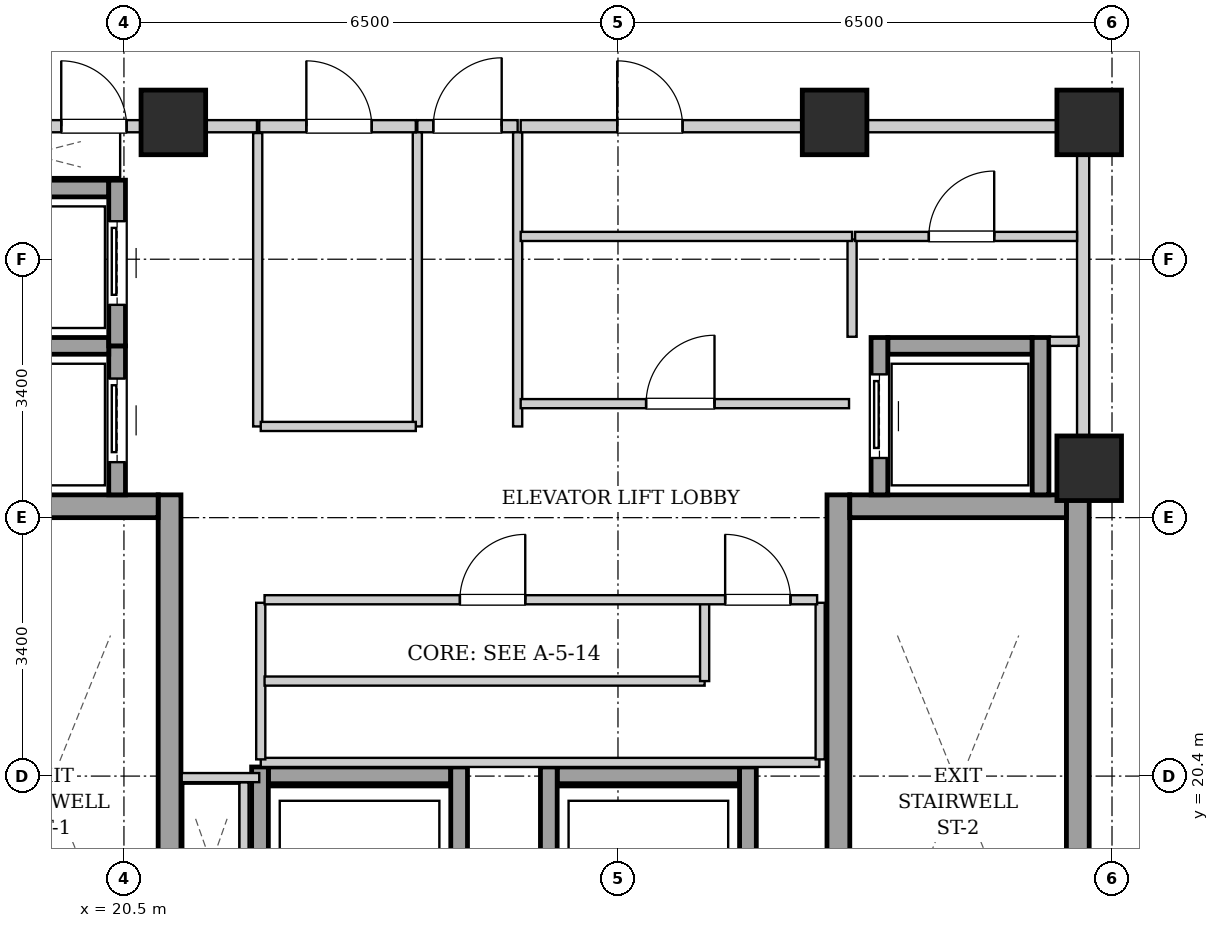
"""IFC4 building model, lengths in metres.
Left out: names, types, materials, properties, quantities, classifications, styles, units other than length and angle.
Written with IfcOpenShell. Run it as: python <this file> out.ifc"""

import sys

from ifc_helpers import new_model, si_unit, direction, frame, frame_2d, origin, origin_2d, place, context, subcontext, project, spatial, rectangle, extrude, element, fill, save


model = new_model("IFC4")
c1 = context("Model", 3, precision=1e-05, world=origin(), true_north=direction((0.0, 1.0)))
c2 = subcontext(c1, "Body", "Model", "MODEL_VIEW")
j1 = project(units=[si_unit("LENGTHUNIT", "METRE"), si_unit("PLANEANGLEUNIT", "RADIAN")], contexts=[c1])
p1 = place(None, origin())
s1 = spatial("IfcSite", under=j1, at=p1, CompositionType="ELEMENT")
p2 = place(p1, origin())
s2 = spatial("IfcBuilding", under=s1, at=p2, CompositionType="ELEMENT")
p3 = place(p2, frame((0.0, 0.0, 197.5)))
s3 = spatial("IfcBuildingStorey", under=s2, at=p3, CompositionType="ELEMENT", Elevation=197.5)
for number, where, z_axis, x_axis in (
    (1, (21.15, 29.0, 0.0), (0.0, 0.0, 1.0), (1.0, 0.0, 0.0)),
    (2, (29.85, 29.0, 0.0), (0.0, 0.0, 1.0), (1.0, 0.0, 0.0)),
    (3, (33.2, 29.0, 0.0), (0.0, 0.0, 1.0), (1.0, 0.0, 0.0)),
    (4, (33.2, 24.45, 0.0), (0.0, 0.0, 1.0), (1.0, 0.0, 0.0)),
):
    element("IfcColumn", number, at=place(p3, frame(where, z_axis=z_axis, x_axis=x_axis)), inside=s3, PredefinedType="COLUMN", context=c2, shape_type="SweptSolid", body=[
        extrude(rectangle(XDim=0.85, YDim=0.85, at=origin_2d()), origin(), (0.0, 0.0, 1.0), 3.3),
    ])
p4 = place(p3, frame((21.1, 15.1, 0.0), z_axis=(0.0, 0.0, 1.0), x_axis=(0.0, 1.0, 0.0)))
e5 = element("IfcWall", 5, at=p4, inside=s3, PredefinedType="SHEAR", context=c2, shape_type="SweptSolid", body=[
    extrude(rectangle(XDim=9.0, YDim=0.3, at=frame_2d((4.5, 0.0))), origin(), (0.0, 0.0, 1.0), 3.04),
])
p5 = place(p3, frame((18.1, 23.95, 0.0), z_axis=(0.0, 0.0, 1.0), x_axis=(1.0, 0.0, 0.0)))
e6 = element("IfcWall", 6, at=p5, inside=s3, PredefinedType="SHEAR", context=c2, shape_type="SweptSolid", body=[
    extrude(rectangle(XDim=2.85, YDim=0.3, at=frame_2d((1.425, 0.0))), origin(), (0.0, 0.0, 1.0), 3.04),
])
for number, where, z_axis, x_axis in (
    (7, (29.9, 15.1, 0.0), (0.0, 0.0, 1.0), (0.0, 1.0, 0.0)),
    (8, (33.05, 15.1, 0.0), (0.0, 0.0, 1.0), (0.0, 1.0, 0.0)),
):
    element("IfcWall", number, at=place(p3, frame(where, z_axis=z_axis, x_axis=x_axis)), inside=s3, PredefinedType="SHEAR", context=c2, shape_type="SweptSolid", body=[
        extrude(rectangle(XDim=9.0, YDim=0.3, at=frame_2d((4.5, 0.0))), origin(), (0.0, 0.0, 1.0), 3.04),
    ])
p6 = place(p3, frame((30.05, 23.95, 0.0), z_axis=(0.0, 0.0, 1.0), x_axis=(1.0, 0.0, 0.0)))
e9 = element("IfcWall", 9, at=p6, inside=s3, PredefinedType="SHEAR", context=c2, shape_type="SweptSolid", body=[
    extrude(rectangle(XDim=2.85, YDim=0.3, at=frame_2d((1.425, 0.0))), origin(), (0.0, 0.0, 1.0), 3.04),
])
p7 = place(p3, frame((20.41, 24.1, 0.0), z_axis=(0.0, 0.0, 1.0), x_axis=(0.0, 1.0, 0.0)))
e10 = element("IfcWall", 10, at=p7, inside=s3, PredefinedType="SHEAR", context=c2, shape_type="SweptSolid", body=[
    extrude(rectangle(XDim=1.96, YDim=0.22, at=frame_2d((0.98, 0.0))), origin(), (0.0, 0.0, 1.0), 3.04),
])
p8 = place(p7, frame((0.43, 0.0, 0.0)))
e11 = element("IfcOpeningElement", 11, at=p8, cuts=e10, PredefinedType="OPENING", context=c2, shape_type="SweptSolid", body=[
    extrude(rectangle(XDim=1.1, YDim=2.15, at=frame_2d((0.55, 1.075))), frame((0.0, 0.12, 0.0), z_axis=(0.0, -1.0, 0.0), x_axis=(1.0, 0.0, 0.0)), (0.0, 0.0, 1.0), 0.24),
])
for number, where, z_axis, x_axis in (
    (12, (18.4, 26.06, 0.0), (0.0, 0.0, 1.0), (1.0, 0.0, 0.0)),
    (13, (18.4, 28.13, 0.0), (0.0, 0.0, 1.0), (1.0, 0.0, 0.0)),
):
    element("IfcWall", number, at=place(p3, frame(where, z_axis=z_axis, x_axis=x_axis)), inside=s3, PredefinedType="SHEAR", context=c2, shape_type="SweptSolid", body=[
        extrude(rectangle(XDim=1.9, YDim=0.22, at=frame_2d((0.95, 0.0))), origin(), (0.0, 0.0, 1.0), 3.04),
    ])
p9 = place(p3, frame((20.41, 26.06, 0.0), z_axis=(0.0, 0.0, 1.0), x_axis=(0.0, 1.0, 0.0)))
e14 = element("IfcWall", 14, at=p9, inside=s3, PredefinedType="SHEAR", context=c2, shape_type="SweptSolid", body=[
    extrude(rectangle(XDim=2.18, YDim=0.22, at=frame_2d((1.09, 0.0))), origin(), (0.0, 0.0, 1.0), 3.04),
])
p10 = place(p9, frame((0.54, 0.0, 0.0)))
e15 = element("IfcOpeningElement", 15, at=p10, cuts=e14, PredefinedType="OPENING", context=c2, shape_type="SweptSolid", body=[
    extrude(rectangle(XDim=1.1, YDim=2.15, at=frame_2d((0.55, 1.075))), frame((0.0, 0.12, 0.0), z_axis=(0.0, -1.0, 0.0), x_axis=(1.0, 0.0, 0.0)), (0.0, 0.0, 1.0), 0.24),
])
p11 = place(p3, frame((30.55, 26.06, 0.0), z_axis=(0.0, 0.0, 1.0), x_axis=(1.0, 0.0, 0.0)))
e16 = element("IfcWall", 16, at=p11, inside=s3, PredefinedType="SHEAR", context=c2, shape_type="SweptSolid", body=[
    extrude(rectangle(XDim=1.9, YDim=0.22, at=frame_2d((0.95, 0.0))), origin(), (0.0, 0.0, 1.0), 3.04),
])
p12 = place(p3, frame((30.44, 24.1, 0.0), z_axis=(0.0, 0.0, 1.0), x_axis=(0.0, 1.0, 0.0)))
e17 = element("IfcWall", 17, at=p12, inside=s3, PredefinedType="SHEAR", context=c2, shape_type="SweptSolid", body=[
    extrude(rectangle(XDim=2.07, YDim=0.22, at=frame_2d((1.035, 0.0))), origin(), (0.0, 0.0, 1.0), 3.04),
])
p13 = place(p12, frame((0.485, 0.0, 0.0)))
e18 = element("IfcOpeningElement", 18, at=p13, cuts=e17, PredefinedType="OPENING", context=c2, shape_type="SweptSolid", body=[
    extrude(rectangle(XDim=1.1, YDim=2.15, at=frame_2d((0.55, 1.075))), frame((0.0, 0.12, 0.0), z_axis=(0.0, -1.0, 0.0), x_axis=(1.0, 0.0, 0.0)), (0.0, 0.0, 1.0), 0.24),
])
p14 = place(p3, frame((32.56, 24.1, 0.0), z_axis=(0.0, 0.0, 1.0), x_axis=(0.0, 1.0, 0.0)))
e19 = element("IfcWall", 19, at=p14, inside=s3, PredefinedType="SHEAR", context=c2, shape_type="SweptSolid", body=[
    extrude(rectangle(XDim=2.07, YDim=0.22, at=frame_2d((1.035, 0.0))), origin(), (0.0, 0.0, 1.0), 3.04),
])
p15 = place(p3, frame((22.4, 20.41, 0.0), z_axis=(0.0, 0.0, 1.0), x_axis=(1.0, 0.0, 0.0)))
e20 = element("IfcWall", 20, at=p15, inside=s3, PredefinedType="SHEAR", context=c2, shape_type="SweptSolid", body=[
    extrude(rectangle(XDim=2.4, YDim=0.22, at=frame_2d((1.2, 0.0))), origin(), (0.0, 0.0, 1.0), 3.04),
])
for number, where, z_axis, x_axis in (
    (21, (22.29, 17.98, 0.0), (0.0, 0.0, 1.0), (0.0, 1.0, 0.0)),
    (22, (24.91, 17.98, 0.0), (0.0, 0.0, 1.0), (0.0, 1.0, 0.0)),
):
    element("IfcWall", number, at=place(p3, frame(where, z_axis=z_axis, x_axis=x_axis)), inside=s3, PredefinedType="SHEAR", context=c2, shape_type="SweptSolid", body=[
        extrude(rectangle(XDim=2.54, YDim=0.22, at=frame_2d((1.27, 0.0))), origin(), (0.0, 0.0, 1.0), 3.04),
    ])
p16 = place(p3, frame((26.2, 20.41, 0.0), z_axis=(0.0, 0.0, 1.0), x_axis=(1.0, 0.0, 0.0)))
e23 = element("IfcWall", 23, at=p16, inside=s3, PredefinedType="SHEAR", context=c2, shape_type="SweptSolid", body=[
    extrude(rectangle(XDim=2.4, YDim=0.22, at=frame_2d((1.2, 0.0))), origin(), (0.0, 0.0, 1.0), 3.04),
])
for number, where, z_axis, x_axis in (
    (24, (26.09, 17.98, 0.0), (0.0, 0.0, 1.0), (0.0, 1.0, 0.0)),
    (25, (28.71, 17.98, 0.0), (0.0, 0.0, 1.0), (0.0, 1.0, 0.0)),
):
    element("IfcWall", number, at=place(p3, frame(where, z_axis=z_axis, x_axis=x_axis)), inside=s3, PredefinedType="SHEAR", context=c2, shape_type="SweptSolid", body=[
        extrude(rectangle(XDim=2.54, YDim=0.22, at=frame_2d((1.27, 0.0))), origin(), (0.0, 0.0, 1.0), 3.04),
    ])
p17 = place(p3, frame((33.12, 24.12, 0.0), z_axis=(0.0, 0.0, 1.0), x_axis=(0.0, 1.0, 0.0)))
e26 = element("IfcWall", 26, at=p17, inside=s3, PredefinedType="PARTITIONING", context=c2, shape_type="SweptSolid", body=[
    extrude(rectangle(XDim=4.76, YDim=0.16, at=frame_2d((2.38, 0.0))), origin(), (0.0, 0.0, 1.0), 2.375),
])
p18 = place(p3, frame((24.36, 28.95, 0.0), z_axis=(0.0, 0.0, 1.0), x_axis=(1.0, 0.0, 0.0)))
e27 = element("IfcWall", 27, at=p18, inside=s3, PredefinedType="PARTITIONING", context=c2, shape_type="SweptSolid", body=[
    extrude(rectangle(XDim=1.32, YDim=0.16, at=frame_2d((0.66, 0.0))), origin(), (0.0, 0.0, 1.0), 2.556),
])
p19 = place(p18, frame((0.21, 0.0, 0.0)))
e28 = element("IfcOpeningElement", 28, at=p19, cuts=e27, PredefinedType="OPENING", context=c2, shape_type="SweptSolid", body=[
    extrude(rectangle(XDim=0.9, YDim=2.05, at=frame_2d((0.45, 1.025))), frame((0.0, 0.09, 0.0), z_axis=(0.0, -1.0, 0.0), x_axis=(1.0, 0.0, 0.0)), (0.0, 0.0, 1.0), 0.18),
])
p20 = place(p3, frame((17.96, 28.95, 0.0), z_axis=(0.0, 0.0, 1.0), x_axis=(1.0, 0.0, 0.0)))
e29 = element("IfcWall", 29, at=p20, inside=s3, PredefinedType="PARTITIONING", context=c2, shape_type="SweptSolid", body=[
    extrude(rectangle(XDim=4.29, YDim=0.16, at=frame_2d((2.145, 0.0))), origin(), (0.0, 0.0, 1.0), 2.556),
])
p21 = place(p20, frame((1.715, 0.0, 0.0)))
e30 = element("IfcOpeningElement", 30, at=p21, cuts=e29, PredefinedType="OPENING", context=c2, shape_type="SweptSolid", body=[
    extrude(rectangle(XDim=0.86, YDim=2.05, at=frame_2d((0.43, 1.025))), frame((0.0, 0.09, 0.0), z_axis=(0.0, -1.0, 0.0), x_axis=(1.0, 0.0, 0.0)), (0.0, 0.0, 1.0), 0.18),
])
p22 = place(p3, frame((22.08, 18.2, 0.0), z_axis=(0.0, 0.0, 1.0), x_axis=(0.0, 1.0, 0.0)))
e31 = element("IfcWall", 31, at=p22, inside=s3, PredefinedType="PARTITIONING", context=c2, shape_type="SweptSolid", body=[
    extrude(rectangle(XDim=2.12, YDim=0.12, at=frame_2d((1.06, 0.0))), origin(), (0.0, 0.0, 1.0), 3.04),
])
p23 = place(p3, frame((22.28, 20.38, 0.0), z_axis=(0.0, 0.0, 1.0), x_axis=(-1.0, 0.0, 0.0)))
e32 = element("IfcWall", 32, at=p23, inside=s3, PredefinedType="PARTITIONING", context=c2, shape_type="SweptSolid", body=[
    extrude(rectangle(XDim=1.02, YDim=0.12, at=frame_2d((0.51, 0.0))), origin(), (0.0, 0.0, 1.0), 3.04),
])
for number, where, z_axis, x_axis in (
    (33, (24.36, 25.0, 0.0), (0.0, 0.0, 1.0), (0.0, 1.0, 0.0)),
    (34, (25.68, 25.0, 0.0), (0.0, 0.0, 1.0), (0.0, 1.0, 0.0)),
):
    element("IfcWall", number, at=place(p3, frame(where, z_axis=z_axis, x_axis=x_axis)), inside=s3, PredefinedType="PARTITIONING", context=c2, shape_type="SweptSolid", body=[
        extrude(rectangle(XDim=3.87, YDim=0.12, at=frame_2d((1.935, 0.0))), origin(), (0.0, 0.0, 1.0), 3.04),
    ])
p24 = place(p3, frame((30.08, 26.18, 0.0), z_axis=(0.0, 0.0, 1.0), x_axis=(0.0, 1.0, 0.0)))
e35 = element("IfcWall", 35, at=p24, inside=s3, PredefinedType="PARTITIONING", context=c2, shape_type="SweptSolid", body=[
    extrude(rectangle(XDim=1.28, YDim=0.12, at=frame_2d((0.64, 0.0))), origin(), (0.0, 0.0, 1.0), 3.04),
])
p25 = place(p3, frame((32.68, 26.12, 0.0), z_axis=(0.0, 0.0, 1.0), x_axis=(1.0, 0.0, 0.0)))
e36 = element("IfcWall", 36, at=p25, inside=s3, PredefinedType="PARTITIONING", context=c2, shape_type="SweptSolid", body=[
    extrude(rectangle(XDim=0.38, YDim=0.12, at=frame_2d((0.19, 0.0))), origin(), (0.0, 0.0, 1.0), 3.04),
])
p26 = place(p3, frame((30.12, 27.5, 0.0), z_axis=(0.0, 0.0, 1.0), x_axis=(1.0, 0.0, 0.0)))
e37 = element("IfcWall", 37, at=p26, inside=s3, PredefinedType="PARTITIONING", context=c2, shape_type="SweptSolid", body=[
    extrude(rectangle(XDim=2.92, YDim=0.12, at=frame_2d((1.46, 0.0))), origin(), (0.0, 0.0, 1.0), 3.04),
])
p27 = place(p26, frame((0.97, 0.0, 0.0)))
e38 = element("IfcOpeningElement", 38, at=p27, cuts=e37, PredefinedType="OPENING", context=c2, shape_type="SweptSolid", body=[
    extrude(rectangle(XDim=0.86, YDim=2.05, at=frame_2d((0.43, 1.025))), frame((0.0, 0.07, 0.0), z_axis=(0.0, -1.0, 0.0), x_axis=(1.0, 0.0, 0.0)), (0.0, 0.0, 1.0), 0.14),
])
p28 = place(p3, frame((22.26, 25.0, 0.0), z_axis=(0.0, 0.0, 1.0), x_axis=(0.0, 1.0, 0.0)))
e39 = element("IfcWall", 39, at=p28, inside=s3, PredefinedType="PARTITIONING", context=c2, shape_type="SweptSolid", body=[
    extrude(rectangle(XDim=3.86, YDim=0.12, at=frame_2d((1.93, 0.0))), origin(), (0.0, 0.0, 1.0), 3.04),
])
p29 = place(p3, frame((22.3, 25.0, 0.0), z_axis=(0.0, 0.0, 1.0), x_axis=(1.0, 0.0, 0.0)))
e40 = element("IfcWall", 40, at=p29, inside=s3, PredefinedType="PARTITIONING", context=c2, shape_type="SweptSolid", body=[
    extrude(rectangle(XDim=2.04, YDim=0.12, at=frame_2d((1.02, 0.0))), origin(), (0.0, 0.0, 1.0), 3.04),
])
p30 = place(p3, frame((22.28, 28.95, 0.0), z_axis=(0.0, 0.0, 1.0), x_axis=(1.0, 0.0, 0.0)))
e41 = element("IfcWall", 41, at=p30, inside=s3, PredefinedType="PARTITIONING", context=c2, shape_type="SweptSolid", body=[
    extrude(rectangle(XDim=2.06, YDim=0.16, at=frame_2d((1.03, 0.0))), origin(), (0.0, 0.0, 1.0), 2.556),
])
p31 = place(p30, frame((0.62, 0.0, 0.0)))
e42 = element("IfcOpeningElement", 42, at=p31, cuts=e41, PredefinedType="OPENING", context=c2, shape_type="SweptSolid", body=[
    extrude(rectangle(XDim=0.86, YDim=2.05, at=frame_2d((0.43, 1.025))), frame((0.0, 0.09, 0.0), z_axis=(0.0, -1.0, 0.0), x_axis=(1.0, 0.0, 0.0)), (0.0, 0.0, 1.0), 0.18),
])
p32 = place(p3, frame((25.72, 27.5, 0.0), z_axis=(0.0, 0.0, 1.0), x_axis=(1.0, 0.0, 0.0)))
e43 = element("IfcWall", 43, at=p32, inside=s3, PredefinedType="PARTITIONING", context=c2, shape_type="SweptSolid", body=[
    extrude(rectangle(XDim=4.36, YDim=0.12, at=frame_2d((2.18, 0.0))), origin(), (0.0, 0.0, 1.0), 3.04),
])
p33 = place(p3, frame((25.72, 25.3, 0.0), z_axis=(0.0, 0.0, 1.0), x_axis=(1.0, 0.0, 0.0)))
e44 = element("IfcWall", 44, at=p33, inside=s3, PredefinedType="PARTITIONING", context=c2, shape_type="SweptSolid", body=[
    extrude(rectangle(XDim=4.32, YDim=0.12, at=frame_2d((2.16, 0.0))), origin(), (0.0, 0.0, 1.0), 3.04),
])
p34 = place(p33, frame((1.65, 0.0, 0.0)))
e45 = element("IfcOpeningElement", 45, at=p34, cuts=e44, PredefinedType="OPENING", context=c2, shape_type="SweptSolid", body=[
    extrude(rectangle(XDim=0.9, YDim=2.05, at=frame_2d((0.45, 1.025))), frame((0.0, 0.07, 0.0), z_axis=(0.0, -1.0, 0.0), x_axis=(1.0, 0.0, 0.0)), (0.0, 0.0, 1.0), 0.14),
])
p35 = place(p3, frame((25.72, 28.95, 0.0), z_axis=(0.0, 0.0, 1.0), x_axis=(1.0, 0.0, 0.0)))
e46 = element("IfcWall", 46, at=p35, inside=s3, PredefinedType="PARTITIONING", context=c2, shape_type="SweptSolid", body=[
    extrude(rectangle(XDim=7.32, YDim=0.16, at=frame_2d((3.66, 0.0))), origin(), (0.0, 0.0, 1.0), 2.556),
])
p36 = place(p35, frame((1.27, 0.0, 0.0)))
e47 = element("IfcOpeningElement", 47, at=p36, cuts=e46, PredefinedType="OPENING", context=c2, shape_type="SweptSolid", body=[
    extrude(rectangle(XDim=0.86, YDim=2.05, at=frame_2d((0.43, 1.025))), frame((0.0, 0.09, 0.0), z_axis=(0.0, -1.0, 0.0), x_axis=(1.0, 0.0, 0.0)), (0.0, 0.0, 1.0), 0.18),
])
p37 = place(p3, frame((22.3, 20.58, 0.0), z_axis=(0.0, 0.0, 1.0), x_axis=(1.0, 0.0, 0.0)))
e48 = element("IfcWall", 48, at=p37, inside=s3, PredefinedType="PARTITIONING", context=c2, shape_type="SweptSolid", body=[
    extrude(rectangle(XDim=7.35, YDim=0.12, at=frame_2d((3.675, 0.0))), origin(), (0.0, 0.0, 1.0), 3.04),
])
for number, where, z_axis, x_axis in (
    (49, (22.3, 20.62, 0.0), (0.0, 0.0, 1.0), (0.0, 1.0, 0.0)),
    (50, (29.66, 20.62, 0.0), (0.0, 0.0, 1.0), (0.0, 1.0, 0.0)),
):
    element("IfcWall", number, at=place(p3, frame(where, z_axis=z_axis, x_axis=x_axis)), inside=s3, PredefinedType="PARTITIONING", context=c2, shape_type="SweptSolid", body=[
        extrude(rectangle(XDim=2.06, YDim=0.12, at=frame_2d((1.03, 0.0))), origin(), (0.0, 0.0, 1.0), 3.04),
    ])
p38 = place(p3, frame((22.35, 21.65, 0.0), z_axis=(0.0, 0.0, 1.0), x_axis=(1.0, 0.0, 0.0)))
e51 = element("IfcWall", 51, at=p38, inside=s3, PredefinedType="PARTITIONING", context=c2, shape_type="SweptSolid", body=[
    extrude(rectangle(XDim=5.79, YDim=0.12, at=frame_2d((2.895, 0.0))), origin(), (0.0, 0.0, 1.0), 3.04),
])
p39 = place(p3, frame((28.14, 21.65, 0.0), z_axis=(0.0, 0.0, 1.0), x_axis=(0.0, 1.0, 0.0)))
e52 = element("IfcWall", 52, at=p39, inside=s3, PredefinedType="PARTITIONING", context=c2, shape_type="SweptSolid", body=[
    extrude(rectangle(XDim=1.03, YDim=0.12, at=frame_2d((0.515, 0.0))), origin(), (0.0, 0.0, 1.0), 3.04),
])
p40 = place(p3, frame((22.35, 22.72, 0.0), z_axis=(0.0, 0.0, 1.0), x_axis=(1.0, 0.0, 0.0)))
e53 = element("IfcWall", 53, at=p40, inside=s3, PredefinedType="PARTITIONING", context=c2, shape_type="SweptSolid", body=[
    extrude(rectangle(XDim=7.27, YDim=0.12, at=frame_2d((3.635, 0.0))), origin(), (0.0, 0.0, 1.0), 3.04),
])
p41 = place(p40, frame((2.57, 0.0, 0.0)))
e54 = element("IfcOpeningElement", 54, at=p41, cuts=e53, PredefinedType="OPENING", context=c2, shape_type="SweptSolid", body=[
    extrude(rectangle(XDim=0.86, YDim=2.05, at=frame_2d((0.43, 1.025))), frame((0.0, 0.07, 0.0), z_axis=(0.0, -1.0, 0.0), x_axis=(1.0, 0.0, 0.0)), (0.0, 0.0, 1.0), 0.14),
])
p42 = place(p40, frame((6.06, 0.0, 0.0)))
e55 = element("IfcOpeningElement", 55, at=p42, cuts=e53, PredefinedType="OPENING", context=c2, shape_type="SweptSolid", body=[
    extrude(rectangle(XDim=0.86, YDim=2.05, at=frame_2d((0.43, 1.025))), frame((0.0, 0.07, 0.0), z_axis=(0.0, -1.0, 0.0), x_axis=(1.0, 0.0, 0.0)), (0.0, 0.0, 1.0), 0.14),
])
p43 = place(p8, origin())
e56 = element("IfcDoor", 56, at=p43, inside=s3, OperationType="SLIDING_TO_LEFT", PredefinedType="DOOR", context=c2, shape_type="SweptSolid", body=[
    extrude(rectangle(XDim=1.1, YDim=2.15, at=frame_2d((0.55, 1.075))), frame((0.0, 0.025, 0.0), z_axis=(0.0, -1.0, 0.0), x_axis=(1.0, 0.0, 0.0)), (0.0, 0.0, 1.0), 0.05),
])
fill(e11, e56)
p44 = place(p10, origin())
e57 = element("IfcDoor", 57, at=p44, inside=s3, OperationType="SLIDING_TO_LEFT", PredefinedType="DOOR", context=c2, shape_type="SweptSolid", body=[
    extrude(rectangle(XDim=1.1, YDim=2.15, at=frame_2d((0.55, 1.075))), frame((0.0, 0.025, 0.0), z_axis=(0.0, -1.0, 0.0), x_axis=(1.0, 0.0, 0.0)), (0.0, 0.0, 1.0), 0.05),
])
fill(e15, e57)
p45 = place(p13, origin())
e58 = element("IfcDoor", 58, at=p45, inside=s3, OperationType="SLIDING_TO_LEFT", PredefinedType="DOOR", context=c2, shape_type="SweptSolid", body=[
    extrude(rectangle(XDim=1.1, YDim=2.15, at=frame_2d((0.55, 1.075))), frame((0.0, 0.025, 0.0), z_axis=(0.0, -1.0, 0.0), x_axis=(1.0, 0.0, 0.0)), (0.0, 0.0, 1.0), 0.05),
])
fill(e18, e58)
p46 = place(p19, origin())
e59 = element("IfcDoor", 59, at=p46, inside=s3, OperationType="SINGLE_SWING_RIGHT", PredefinedType="DOOR", context=c2, shape_type="SweptSolid", body=[
    extrude(rectangle(XDim=0.9, YDim=2.05, at=frame_2d((0.45, 1.025))), frame((0.0, 0.025, 0.0), z_axis=(0.0, -1.0, 0.0), x_axis=(1.0, 0.0, 0.0)), (0.0, 0.0, 1.0), 0.05),
])
fill(e28, e59)
p47 = place(p21, origin())
e60 = element("IfcDoor", 60, at=p47, inside=s3, OperationType="SINGLE_SWING_LEFT", PredefinedType="DOOR", context=c2, shape_type="SweptSolid", body=[
    extrude(rectangle(XDim=0.86, YDim=2.05, at=frame_2d((0.43, 1.025))), frame((0.0, 0.025, 0.0), z_axis=(0.0, -1.0, 0.0), x_axis=(1.0, 0.0, 0.0)), (0.0, 0.0, 1.0), 0.05),
])
fill(e30, e60)
p48 = place(p27, origin())
e61 = element("IfcDoor", 61, at=p48, inside=s3, OperationType="SINGLE_SWING_RIGHT", PredefinedType="DOOR", context=c2, shape_type="SweptSolid", body=[
    extrude(rectangle(XDim=0.86, YDim=2.05, at=frame_2d((0.43, 1.025))), frame((0.0, 0.025, 0.0), z_axis=(0.0, -1.0, 0.0), x_axis=(1.0, 0.0, 0.0)), (0.0, 0.0, 1.0), 0.05),
])
fill(e38, e61)
p49 = place(p31, origin())
e62 = element("IfcDoor", 62, at=p49, inside=s3, OperationType="SINGLE_SWING_LEFT", PredefinedType="DOOR", context=c2, shape_type="SweptSolid", body=[
    extrude(rectangle(XDim=0.86, YDim=2.05, at=frame_2d((0.43, 1.025))), frame((0.0, 0.025, 0.0), z_axis=(0.0, -1.0, 0.0), x_axis=(1.0, 0.0, 0.0)), (0.0, 0.0, 1.0), 0.05),
])
fill(e42, e62)
p50 = place(p34, origin())
e63 = element("IfcDoor", 63, at=p50, inside=s3, OperationType="SINGLE_SWING_RIGHT", PredefinedType="DOOR", context=c2, shape_type="SweptSolid", body=[
    extrude(rectangle(XDim=0.9, YDim=2.05, at=frame_2d((0.45, 1.025))), frame((0.0, 0.025, 0.0), z_axis=(0.0, -1.0, 0.0), x_axis=(1.0, 0.0, 0.0)), (0.0, 0.0, 1.0), 0.05),
])
fill(e45, e63)
p51 = place(p36, origin())
e64 = element("IfcDoor", 64, at=p51, inside=s3, OperationType="SINGLE_SWING_LEFT", PredefinedType="DOOR", context=c2, shape_type="SweptSolid", body=[
    extrude(rectangle(XDim=0.86, YDim=2.05, at=frame_2d((0.43, 1.025))), frame((0.0, 0.025, 0.0), z_axis=(0.0, -1.0, 0.0), x_axis=(1.0, 0.0, 0.0)), (0.0, 0.0, 1.0), 0.05),
])
fill(e47, e64)
p52 = place(p41, origin())
e65 = element("IfcDoor", 65, at=p52, inside=s3, OperationType="SINGLE_SWING_RIGHT", PredefinedType="DOOR", context=c2, shape_type="SweptSolid", body=[
    extrude(rectangle(XDim=0.86, YDim=2.05, at=frame_2d((0.43, 1.025))), frame((0.0, 0.025, 0.0), z_axis=(0.0, -1.0, 0.0), x_axis=(1.0, 0.0, 0.0)), (0.0, 0.0, 1.0), 0.05),
])
fill(e54, e65)
p53 = place(p42, origin())
e66 = element("IfcDoor", 66, at=p53, inside=s3, OperationType="SINGLE_SWING_LEFT", PredefinedType="DOOR", context=c2, shape_type="SweptSolid", body=[
    extrude(rectangle(XDim=0.86, YDim=2.05, at=frame_2d((0.43, 1.025))), frame((0.0, 0.025, 0.0), z_axis=(0.0, -1.0, 0.0), x_axis=(1.0, 0.0, 0.0)), (0.0, 0.0, 1.0), 0.05),
])
fill(e55, e66)
save(model, sys.argv[1])
